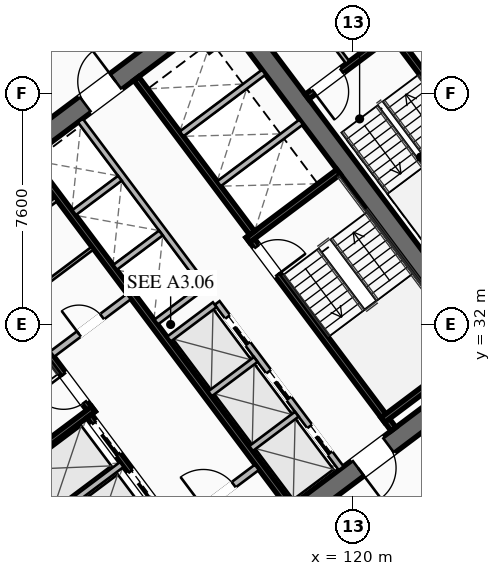
"""IFC4 building model, lengths in metres.
Left out: names, types, materials, properties, quantities, classifications, styles, units other than length and angle.
Written with IfcOpenShell. Run it as: python <this file> out.ifc"""

import sys

from ifc_helpers import new_model, si_unit, direction, frame, frame_2d, origin, place, context, subcontext, project, spatial, rectangle, extrude, element, fill, save


model = new_model("IFC4")
c1 = context("Model", 3, precision=1e-05, world=origin(), true_north=direction((0.0, 1.0)))
c2 = subcontext(c1, "Body", "Model", "MODEL_VIEW")
j1 = project(units=[si_unit("LENGTHUNIT", "METRE"), si_unit("PLANEANGLEUNIT", "RADIAN")], contexts=[c1])
p1 = place(None, origin())
s1 = spatial("IfcSite", under=j1, at=p1, CompositionType="ELEMENT")
p2 = place(p1, origin())
s2 = spatial("IfcBuilding", under=s1, at=p2, CompositionType="ELEMENT")
p3 = place(p2, frame((0.0, 0.0, 28.15)))
s3 = spatial("IfcBuildingStorey", under=s2, at=p3, CompositionType="ELEMENT", Elevation=28.15)
for number, where, z_axis, x_axis in (
    (1, (112.476, 21.107, 0.0), (0.0, 0.0, 1.0), (-0.6, 0.8, 0.0)),
    (2, (115.524, 42.893, 0.0), (0.0, 0.0, 1.0), (0.6, -0.8, 0.0)),
):
    element("IfcWall", number, at=place(p3, frame(where, z_axis=z_axis, x_axis=x_axis)), inside=s3, PredefinedType="SHEAR", context=c2, shape_type="SweptSolid", body=[
        extrude(rectangle(XDim=15.6, YDim=0.65, at=frame_2d((7.8, 0.0))), origin(), (0.0, 0.0, 1.0), 3.55),
    ])
p4 = place(p3, frame((124.429, 30.478, 0.0), z_axis=(0.0, 0.0, 1.0), x_axis=(-0.799998028465, -0.600002628705, 0.0)))
e3 = element("IfcWall", 3, at=p4, inside=s3, PredefinedType="SHEAR", context=c2, shape_type="SweptSolid", body=[
    extrude(rectangle(XDim=14.86, YDim=0.65, at=frame_2d((7.43, 0.0))), origin(), (0.0, 0.0, 1.0), 3.55),
])
p5 = place(p4, frame((9.13, 0.0, 0.0)))
e4 = element("IfcOpeningElement", 4, at=p5, cuts=e3, PredefinedType="OPENING", context=c2, shape_type="SweptSolid", body=[
    extrude(rectangle(XDim=1.25, YDim=2.25, at=frame_2d((0.625, 1.125))), frame((0.0, 0.335, 0.0), z_axis=(0.0, -1.0, 0.0), x_axis=(1.0, 0.0, 0.0)), (0.0, 0.0, 1.0), 0.67),
])
p6 = place(p4, frame((4.08, 0.0, 0.0)))
e5 = element("IfcOpeningElement", 5, at=p6, cuts=e3, PredefinedType="OPENING", context=c2, shape_type="SweptSolid", body=[
    extrude(rectangle(XDim=1.25, YDim=2.25, at=frame_2d((0.625, 1.125))), frame((0.0, 0.335, 0.0), z_axis=(0.0, -1.0, 0.0), x_axis=(1.0, 0.0, 0.0)), (0.0, 0.0, 1.0), 0.67),
])
p7 = place(p3, frame((103.571, 33.522, 0.0), z_axis=(0.0, 0.0, 1.0), x_axis=(0.799998028465, 0.600002628705, 0.0)))
e6 = element("IfcWall", 6, at=p7, inside=s3, PredefinedType="SHEAR", context=c2, shape_type="SweptSolid", body=[
    extrude(rectangle(XDim=14.86, YDim=0.65, at=frame_2d((7.43, 0.0))), origin(), (0.0, 0.0, 1.0), 3.55),
])
p8 = place(p7, frame((4.48, 0.0, 0.0)))
e7 = element("IfcOpeningElement", 7, at=p8, cuts=e6, PredefinedType="OPENING", context=c2, shape_type="SweptSolid", body=[
    extrude(rectangle(XDim=1.25, YDim=2.25, at=frame_2d((0.625, 1.125))), frame((0.0, 0.335, 0.0), z_axis=(0.0, -1.0, 0.0), x_axis=(1.0, 0.0, 0.0)), (0.0, 0.0, 1.0), 0.67),
])
p9 = place(p7, frame((9.53, 0.0, 0.0)))
e8 = element("IfcOpeningElement", 8, at=p9, cuts=e6, PredefinedType="OPENING", context=c2, shape_type="SweptSolid", body=[
    extrude(rectangle(XDim=1.25, YDim=2.25, at=frame_2d((0.625, 1.125))), frame((0.0, 0.335, 0.0), z_axis=(0.0, -1.0, 0.0), x_axis=(1.0, 0.0, 0.0)), (0.0, 0.0, 1.0), 0.67),
])
p10 = place(p3, frame((111.44, 29.08, 0.0), z_axis=(0.0, 0.0, 1.0), x_axis=(-0.600009827119, 0.799992629566, 0.0)))
e9 = element("IfcWall", 9, at=p10, inside=s3, PredefinedType="SHEAR", context=c2, shape_type="SweptSolid", body=[
    extrude(rectangle(XDim=7.95, YDim=0.2, at=frame_2d((3.975, 0.0))), origin(), (0.0, 0.0, 1.0), 3.35),
])
p11 = place(p10, frame((0.45, 0.0, 0.0)))
e10 = element("IfcOpeningElement", 10, at=p11, cuts=e9, PredefinedType="OPENING", context=c2, shape_type="SweptSolid", body=[
    extrude(rectangle(XDim=1.15, YDim=2.2, at=frame_2d((0.575, 1.1))), frame((0.0, 0.11, 0.0), z_axis=(0.0, -1.0, 0.0), x_axis=(1.0, 0.0, 0.0)), (0.0, 0.0, 1.0), 0.22),
])
p12 = place(p3, frame((108.476, 26.982, 0.0), z_axis=(0.0, 0.0, 1.0), x_axis=(0.799984290658, 0.600020945218, 0.0)))
e11 = element("IfcWall", 11, at=p12, inside=s3, PredefinedType="SHEAR", context=c2, shape_type="SweptSolid", body=[
    extrude(rectangle(XDim=3.73, YDim=0.2, at=frame_2d((1.865, 0.0))), origin(), (0.0, 0.0, 1.0), 3.35),
])
p13 = place(p3, frame((116.56, 34.92, 0.0), z_axis=(0.0, 0.0, 1.0), x_axis=(0.600009827119, -0.799992629566, 0.0)))
e12 = element("IfcWall", 12, at=p13, inside=s3, PredefinedType="SHEAR", context=c2, shape_type="SweptSolid", body=[
    extrude(rectangle(XDim=7.95, YDim=0.2, at=frame_2d((3.975, 0.0))), origin(), (0.0, 0.0, 1.0), 3.35),
])
p14 = place(p13, frame((0.45, 0.0, 0.0)))
e13 = element("IfcOpeningElement", 13, at=p14, cuts=e12, PredefinedType="OPENING", context=c2, shape_type="SweptSolid", body=[
    extrude(rectangle(XDim=1.15, YDim=2.2, at=frame_2d((0.575, 1.1))), frame((0.0, 0.11, 0.0), z_axis=(0.0, -1.0, 0.0), x_axis=(1.0, 0.0, 0.0)), (0.0, 0.0, 1.0), 0.22),
])
for number, where, z_axis, x_axis in (
    (14, (116.54, 34.78, 0.0), (0.0, 0.0, 1.0), (0.8, 0.6, 0.0)),
    (15, (120.98, 28.86, 0.0), (0.0, 0.0, 1.0), (0.8, 0.6, 0.0)),
):
    element("IfcWall", number, at=place(p3, frame(where, z_axis=z_axis, x_axis=x_axis)), inside=s3, PredefinedType="SHEAR", context=c2, shape_type="SweptSolid", body=[
        extrude(rectangle(XDim=3.73, YDim=0.2, at=frame_2d((1.865, 0.0))), origin(), (0.0, 0.0, 1.0), 3.35),
    ])
p15 = place(p3, frame((117.938, 26.016, 0.0), z_axis=(0.0, 0.0, 1.0), x_axis=(-0.600005463273, 0.799995902516, 0.0)))
e16 = element("IfcWall", 16, at=p15, inside=s3, PredefinedType="SHEAR", context=c2, shape_type="SweptSolid", body=[
    extrude(rectangle(XDim=14.3, YDim=0.2, at=frame_2d((7.15, 0.0))), origin(), (0.0, 0.0, 1.0), 3.35),
])
p16 = place(p3, frame((110.104, 31.028, 0.0), z_axis=(0.0, 0.0, 1.0), x_axis=(0.800018601094, 0.59997519774, 0.0)))
e17 = element("IfcWall", 17, at=p16, inside=s3, PredefinedType="SOLIDWALL", context=c2, shape_type="SweptSolid", body=[
    extrude(rectangle(XDim=3.15, YDim=0.22, at=frame_2d((1.575, 0.0))), origin(), (0.0, 0.0, 1.0), 2.703),
])
p17 = place(p16, frame((1.1, 0.0, 0.0)))
e18 = element("IfcOpeningElement", 18, at=p17, cuts=e17, PredefinedType="OPENING", context=c2, shape_type="SweptSolid", body=[
    extrude(rectangle(XDim=0.95, YDim=2.05, at=frame_2d((0.475, 1.025))), frame((0.0, 0.12, 0.0), z_axis=(0.0, -1.0, 0.0), x_axis=(1.0, 0.0, 0.0)), (0.0, 0.0, 1.0), 0.24),
])
p18 = place(p3, frame((114.316, 25.412, 0.0), z_axis=(0.0, 0.0, 1.0), x_axis=(0.800018601094, 0.59997519774, 0.0)))
e19 = element("IfcWall", 19, at=p18, inside=s3, PredefinedType="SOLIDWALL", context=c2, shape_type="SweptSolid", body=[
    extrude(rectangle(XDim=3.15, YDim=0.22, at=frame_2d((1.575, 0.0))), origin(), (0.0, 0.0, 1.0), 2.703),
])
p19 = place(p18, frame((0.95, 0.0, 0.0)))
e20 = element("IfcOpeningElement", 20, at=p19, cuts=e19, PredefinedType="OPENING", context=c2, shape_type="SweptSolid", body=[
    extrude(rectangle(XDim=1.25, YDim=2.25, at=frame_2d((0.625, 1.125))), frame((0.0, 0.12, 0.0), z_axis=(0.0, -1.0, 0.0), x_axis=(1.0, 0.0, 0.0)), (0.0, 0.0, 1.0), 0.24),
])
p20 = place(p3, frame((115.13, 23.91, 0.0), z_axis=(0.0, 0.0, 1.0), x_axis=(-0.599975393228, 0.800018454488, 0.0)))
e21 = element("IfcWall", 21, at=p20, inside=s3, PredefinedType="SHEAR", context=c2, shape_type="SweptSolid", body=[
    extrude(rectangle(XDim=6.35, YDim=0.2, at=frame_2d((3.175, 0.0))), origin(), (0.0, 0.0, 1.0), 3.35),
])
p21 = place(p20, frame((4.775, 0.0, 0.0)))
e22 = element("IfcOpeningElement", 22, at=p21, cuts=e21, PredefinedType="OPENING", context=c2, shape_type="SweptSolid", body=[
    extrude(rectangle(XDim=1.3, YDim=2.25, at=frame_2d((0.65, 1.125))), frame((0.0, 0.11, 0.0), z_axis=(0.0, -1.0, 0.0), x_axis=(1.0, 0.0, 0.0)), (0.0, 0.0, 1.0), 0.22),
])
p22 = place(p20, frame((2.775, 0.0, 0.0)))
e23 = element("IfcOpeningElement", 23, at=p22, cuts=e21, PredefinedType="OPENING", context=c2, shape_type="SweptSolid", body=[
    extrude(rectangle(XDim=1.3, YDim=2.25, at=frame_2d((0.65, 1.125))), frame((0.0, 0.11, 0.0), z_axis=(0.0, -1.0, 0.0), x_axis=(1.0, 0.0, 0.0)), (0.0, 0.0, 1.0), 0.22),
])
p23 = place(p20, frame((0.575, 0.0, 0.0)))
e24 = element("IfcOpeningElement", 24, at=p23, cuts=e21, PredefinedType="OPENING", context=c2, shape_type="SweptSolid", body=[
    extrude(rectangle(XDim=1.3, YDim=2.25, at=frame_2d((0.65, 1.125))), frame((0.0, 0.11, 0.0), z_axis=(0.0, -1.0, 0.0), x_axis=(1.0, 0.0, 0.0)), (0.0, 0.0, 1.0), 0.22),
])
p24 = place(p3, frame((109.688, 25.366, 0.0), z_axis=(0.0, 0.0, 1.0), x_axis=(0.8, 0.6, 0.0)))
e25 = element("IfcWall", 25, at=p24, inside=s3, PredefinedType="SOLIDWALL", context=c2, shape_type="SweptSolid", body=[
    extrude(rectangle(XDim=3.38, YDim=0.2, at=frame_2d((1.69, 0.0))), origin(), (0.0, 0.0, 1.0), 3.35),
])
p25 = place(p3, frame((112.87, 40.09, 0.0), z_axis=(0.0, 0.0, 1.0), x_axis=(0.599975393228, -0.800018454488, 0.0)))
e26 = element("IfcWall", 26, at=p25, inside=s3, PredefinedType="SHEAR", context=c2, shape_type="SweptSolid", body=[
    extrude(rectangle(XDim=6.35, YDim=0.2, at=frame_2d((3.175, 0.0))), origin(), (0.0, 0.0, 1.0), 3.35),
])
for number, where, z_axis, x_axis in (
    (27, (115.59, 36.63, 0.0), (0.0, 0.0, 1.0), (0.8, 0.6, 0.0)),
    (28, (114.36, 38.27, 0.0), (0.0, 0.0, 1.0), (0.8, 0.6, 0.0)),
):
    element("IfcWall", number, at=place(p3, frame(where, z_axis=z_axis, x_axis=x_axis)), inside=s3, PredefinedType="SOLIDWALL", context=c2, shape_type="SweptSolid", body=[
        extrude(rectangle(XDim=3.38, YDim=0.2, at=frame_2d((1.69, 0.0))), origin(), (0.0, 0.0, 1.0), 3.35),
    ])
p26 = place(p3, frame((107.71, 34.22, 0.0), z_axis=(0.0, 0.0, 1.0), x_axis=(0.799981399002, 0.60002480053, 0.0)))
e29 = element("IfcWall", 29, at=p26, inside=s3, PredefinedType="PARTITIONING", context=c2, shape_type="SweptSolid", body=[
    extrude(rectangle(XDim=3.15, YDim=0.135, at=frame_2d((1.575, 0.0))), origin(), (0.0, 0.0, 1.0), 2.703),
])
p27 = place(p26, frame((1.05, 0.0, 0.0)))
e30 = element("IfcOpeningElement", 30, at=p27, cuts=e29, PredefinedType="OPENING", context=c2, shape_type="SweptSolid", body=[
    extrude(rectangle(XDim=1.05, YDim=2.2, at=frame_2d((0.525, 1.1))), frame((0.0, 0.077, 0.0), z_axis=(0.0, -1.0, 0.0), x_axis=(1.0, 0.0, 0.0)), (0.0, 0.0, 1.0), 0.155),
])
p28 = place(p3, frame((108.91, 32.62, 0.0), z_axis=(0.0, 0.0, 1.0), x_axis=(0.800018601094, 0.59997519774, 0.0)))
e31 = element("IfcWall", 31, at=p28, inside=s3, PredefinedType="PARTITIONING", context=c2, shape_type="SweptSolid", body=[
    extrude(rectangle(XDim=3.15, YDim=0.11, at=frame_2d((1.575, 0.0))), origin(), (0.0, 0.0, 1.0), 2.703),
])
p29 = place(p3, frame((119.61, 27.27, 0.0), z_axis=(0.0, 0.0, 1.0), x_axis=(-0.600011488909, 0.79999138319, 0.0)))
e32 = element("IfcWall", 32, at=p29, inside=s3, PredefinedType="SOLIDWALL", context=c2, shape_type="SweptSolid", body=[
    extrude(rectangle(XDim=6.8, YDim=0.2, at=frame_2d((3.4, 0.0))), origin(), (0.0, 0.0, 1.0), 3.35),
])
p30 = place(p29, frame((0.625, 0.0, 0.0)))
e33 = element("IfcOpeningElement", 33, at=p30, cuts=e32, PredefinedType="OPENING", context=c2, shape_type="SweptSolid", body=[
    extrude(rectangle(XDim=1.1, YDim=2.2, at=frame_2d((0.55, 1.1))), frame((0.0, 0.11, 0.0), z_axis=(0.0, -1.0, 0.0), x_axis=(1.0, 0.0, 0.0)), (0.0, 0.0, 1.0), 0.22),
])
p31 = place(p29, frame((2.875, 0.0, 0.0)))
e34 = element("IfcOpeningElement", 34, at=p31, cuts=e32, PredefinedType="OPENING", context=c2, shape_type="SweptSolid", body=[
    extrude(rectangle(XDim=1.1, YDim=2.2, at=frame_2d((0.55, 1.1))), frame((0.0, 0.11, 0.0), z_axis=(0.0, -1.0, 0.0), x_axis=(1.0, 0.0, 0.0)), (0.0, 0.0, 1.0), 0.22),
])
p32 = place(p29, frame((5.125, 0.0, 0.0)))
e35 = element("IfcOpeningElement", 35, at=p32, cuts=e32, PredefinedType="OPENING", context=c2, shape_type="SweptSolid", body=[
    extrude(rectangle(XDim=1.1, YDim=2.2, at=frame_2d((0.55, 1.1))), frame((0.0, 0.11, 0.0), z_axis=(0.0, -1.0, 0.0), x_axis=(1.0, 0.0, 0.0)), (0.0, 0.0, 1.0), 0.22),
])
p33 = place(p3, frame((116.646, 27.922, 0.0), z_axis=(0.0, 0.0, 1.0), x_axis=(0.8, 0.6, 0.0)))
e36 = element("IfcWall", 36, at=p33, inside=s3, PredefinedType="SOLIDWALL", context=c2, shape_type="SweptSolid", body=[
    extrude(rectangle(XDim=1.88, YDim=0.2, at=frame_2d((0.94, 0.0))), origin(), (0.0, 0.0, 1.0), 3.35),
])
p34 = place(p3, frame((115.296, 29.722, 0.0), z_axis=(0.0, 0.0, 1.0), x_axis=(0.799984418148, 0.600020775241, 0.0)))
e37 = element("IfcWall", 37, at=p34, inside=s3, PredefinedType="SOLIDWALL", context=c2, shape_type="SweptSolid", body=[
    extrude(rectangle(XDim=1.88, YDim=0.2, at=frame_2d((0.94, 0.0))), origin(), (0.0, 0.0, 1.0), 3.35),
])
p35 = place(p3, frame((113.946, 31.522, 0.0), z_axis=(0.0, 0.0, 1.0), x_axis=(0.8, 0.6, 0.0)))
e38 = element("IfcWall", 38, at=p35, inside=s3, PredefinedType="SOLIDWALL", context=c2, shape_type="SweptSolid", body=[
    extrude(rectangle(XDim=1.88, YDim=0.2, at=frame_2d((0.94, 0.0))), origin(), (0.0, 0.0, 1.0), 3.35),
])
p36 = place(p3, frame((115.11, 33.27, 0.0), z_axis=(0.0, 0.0, 1.0), x_axis=(-0.600011488909, 0.79999138319, 0.0)))
e39 = element("IfcWall", 39, at=p36, inside=s3, PredefinedType="SOLIDWALL", context=c2, shape_type="SweptSolid", body=[
    extrude(rectangle(XDim=6.8, YDim=0.2, at=frame_2d((3.4, 0.0))), origin(), (0.0, 0.0, 1.0), 3.35),
])
p37 = place(p3, frame((113.526, 32.082, 0.0), z_axis=(0.0, 0.0, 1.0), x_axis=(0.800046745961, 0.599937666993, 0.0)))
e40 = element("IfcWall", 40, at=p37, inside=s3, PredefinedType="SOLIDWALL", context=c2, shape_type="SweptSolid", body=[
    extrude(rectangle(XDim=1.88, YDim=0.2, at=frame_2d((0.94, 0.0))), origin(), (0.0, 0.0, 1.0), 3.35),
])
p38 = place(p3, frame((112.176, 33.882, 0.0), z_axis=(0.0, 0.0, 1.0), x_axis=(0.8, 0.6, 0.0)))
e41 = element("IfcWall", 41, at=p38, inside=s3, PredefinedType="SOLIDWALL", context=c2, shape_type="SweptSolid", body=[
    extrude(rectangle(XDim=1.88, YDim=0.2, at=frame_2d((0.94, 0.0))), origin(), (0.0, 0.0, 1.0), 3.35),
])
p39 = place(p3, frame((110.826, 35.682, 0.0), z_axis=(0.0, 0.0, 1.0), x_axis=(0.799984418148, 0.600020775241, 0.0)))
e42 = element("IfcWall", 42, at=p39, inside=s3, PredefinedType="SOLIDWALL", context=c2, shape_type="SweptSolid", body=[
    extrude(rectangle(XDim=1.88, YDim=0.2, at=frame_2d((0.94, 0.0))), origin(), (0.0, 0.0, 1.0), 3.35),
])
p40 = place(p3, frame((125.304, 36.228, 0.0), z_axis=(0.0, 0.0, 1.0), x_axis=(-0.59998851072, 0.800008616831, 0.0)))
e43 = element("IfcWall", 43, at=p40, inside=s3, PredefinedType="SHEAR", context=c2, shape_type="SweptSolid", body=[
    extrude(rectangle(XDim=6.8, YDim=0.2, at=frame_2d((3.4, 0.0))), origin(), (0.0, 0.0, 1.0), 3.35),
])
p41 = place(p3, frame((121.204, 41.528, 0.0), z_axis=(0.0, 0.0, 1.0), x_axis=(-0.800017232136, -0.599977023131, 0.0)))
e44 = element("IfcWall", 44, at=p41, inside=s3, PredefinedType="SHEAR", context=c2, shape_type="SweptSolid", body=[
    extrude(rectangle(XDim=3.4, YDim=0.2, at=frame_2d((1.7, 0.0))), origin(), (0.0, 0.0, 1.0), 3.35),
])
p42 = place(p41, frame((1.975, 0.0, 0.0)))
e45 = element("IfcOpeningElement", 45, at=p42, cuts=e44, PredefinedType="OPENING", context=c2, shape_type="SweptSolid", body=[
    extrude(rectangle(XDim=1.15, YDim=2.2, at=frame_2d((0.575, 1.1))), frame((0.0, 0.11, 0.0), z_axis=(0.0, -1.0, 0.0), x_axis=(1.0, 0.0, 0.0)), (0.0, 0.0, 1.0), 0.22),
])
p43 = place(p3, frame((119.824, 40.618, 0.0), z_axis=(0.0, 0.0, 1.0), x_axis=(-0.599982243973, 0.800013316712, 0.0)))
e46 = element("IfcWall", 46, at=p43, inside=s3, PredefinedType="PARTITIONING", context=c2, shape_type="SweptSolid", body=[
    extrude(rectangle(XDim=4.4, YDim=0.135, at=frame_2d((2.2, 0.0))), origin(), (0.0, 0.0, 1.0), 2.703),
])
p44 = place(p3, frame((98.516, 34.012, 0.0), z_axis=(0.0, 0.0, 1.0), x_axis=(0.799998035726, 0.600002619023, 0.0)))
e47 = element("IfcWall", 47, at=p44, inside=s3, PredefinedType="PARTITIONING", context=c2, shape_type="SweptSolid", body=[
    extrude(rectangle(XDim=29.83, YDim=0.135, at=frame_2d((14.915, 0.0))), origin(), (0.0, 0.0, 1.0), 2.703),
])
p45 = place(p44, frame((0.3, 0.0, 0.0)))
e48 = element("IfcOpeningElement", 48, at=p45, cuts=e47, PredefinedType="OPENING", context=c2, shape_type="SweptSolid", body=[
    extrude(rectangle(XDim=0.95, YDim=2.05, at=frame_2d((0.475, 1.025))), frame((0.0, 0.077, 0.0), z_axis=(0.0, -1.0, 0.0), x_axis=(1.0, 0.0, 0.0)), (0.0, 0.0, 1.0), 0.155),
])
p46 = place(p44, frame((10.829, 0.0, 0.0)))
e49 = element("IfcOpeningElement", 49, at=p46, cuts=e47, PredefinedType="OPENING", context=c2, shape_type="SweptSolid", body=[
    extrude(rectangle(XDim=0.95, YDim=2.05, at=frame_2d((0.475, 1.025))), frame((0.0, 0.077, 0.0), z_axis=(0.0, -1.0, 0.0), x_axis=(1.0, 0.0, 0.0)), (0.0, 0.0, 1.0), 0.155),
])
p47 = place(p44, frame((28.58, 0.0, 0.0)))
e50 = element("IfcOpeningElement", 50, at=p47, cuts=e47, PredefinedType="OPENING", context=c2, shape_type="SweptSolid", body=[
    extrude(rectangle(XDim=0.95, YDim=2.05, at=frame_2d((0.475, 1.025))), frame((0.0, 0.077, 0.0), z_axis=(0.0, -1.0, 0.0), x_axis=(1.0, 0.0, 0.0)), (0.0, 0.0, 1.0), 0.155),
])
p48 = place(p3, frame((135.46, 34.47, 0.0), z_axis=(0.0, 0.0, 1.0), x_axis=(-0.800000982127, -0.599998690494, 0.0)))
e51 = element("IfcWall", 51, at=p48, inside=s3, PredefinedType="PARTITIONING", context=c2, shape_type="SweptSolid", body=[
    extrude(rectangle(XDim=29.83, YDim=0.135, at=frame_2d((14.915, 0.0))), origin(), (0.0, 0.0, 1.0), 2.703),
])
p49 = place(p48, frame((28.5, 0.0, 0.0)))
e52 = element("IfcOpeningElement", 52, at=p49, cuts=e51, PredefinedType="OPENING", context=c2, shape_type="SweptSolid", body=[
    extrude(rectangle(XDim=0.95, YDim=2.05, at=frame_2d((0.475, 1.025))), frame((0.0, 0.077, 0.0), z_axis=(0.0, -1.0, 0.0), x_axis=(1.0, 0.0, 0.0)), (0.0, 0.0, 1.0), 0.155),
])
p50 = place(p48, frame((18.075, 0.0, 0.0)))
e53 = element("IfcOpeningElement", 53, at=p50, cuts=e51, PredefinedType="OPENING", context=c2, shape_type="SweptSolid", body=[
    extrude(rectangle(XDim=0.95, YDim=2.05, at=frame_2d((0.475, 1.025))), frame((0.0, 0.077, 0.0), z_axis=(0.0, -1.0, 0.0), x_axis=(1.0, 0.0, 0.0)), (0.0, 0.0, 1.0), 0.155),
])
p51 = place(p48, frame((0.38, 0.0, 0.0)))
e54 = element("IfcOpeningElement", 54, at=p51, cuts=e51, PredefinedType="OPENING", context=c2, shape_type="SweptSolid", body=[
    extrude(rectangle(XDim=0.95, YDim=2.05, at=frame_2d((0.475, 1.025))), frame((0.0, 0.077, 0.0), z_axis=(0.0, -1.0, 0.0), x_axis=(1.0, 0.0, 0.0)), (0.0, 0.0, 1.0), 0.155),
])
p52 = place(p3, frame((111.548, 16.636, 0.0), z_axis=(0.0, 0.0, 1.0), x_axis=(-0.600003610192, 0.799997292343, 0.0)))
e55 = element("IfcWall", 55, at=p52, inside=s3, PredefinedType="PARTITIONING", context=c2, shape_type="SweptSolid", body=[
    extrude(rectangle(XDim=21.64, YDim=0.135, at=frame_2d((10.82, 0.0))), origin(), (0.0, 0.0, 1.0), 2.703),
])
p53 = place(p52, frame((0.3, 0.0, 0.0)))
e56 = element("IfcOpeningElement", 56, at=p53, cuts=e55, PredefinedType="OPENING", context=c2, shape_type="SweptSolid", body=[
    extrude(rectangle(XDim=0.95, YDim=2.05, at=frame_2d((0.475, 1.025))), frame((0.0, 0.077, 0.0), z_axis=(0.0, -1.0, 0.0), x_axis=(1.0, 0.0, 0.0)), (0.0, 0.0, 1.0), 0.155),
])
p54 = place(p9, origin())
e57 = element("IfcDoor", 57, at=p54, inside=s3, OperationType="SINGLE_SWING_RIGHT", PredefinedType="DOOR", context=c2, shape_type="SweptSolid", body=[
    extrude(rectangle(XDim=1.25, YDim=2.25, at=frame_2d((0.625, 1.125))), frame((0.0, 0.025, 0.0), z_axis=(0.0, -1.0, 0.0), x_axis=(1.0, 0.0, 0.0)), (0.0, 0.0, 1.0), 0.05),
])
fill(e8, e57)
p55 = place(p6, origin())
e58 = element("IfcDoor", 58, at=p55, inside=s3, OperationType="SINGLE_SWING_RIGHT", PredefinedType="DOOR", context=c2, shape_type="SweptSolid", body=[
    extrude(rectangle(XDim=1.25, YDim=2.25, at=frame_2d((0.625, 1.125))), frame((0.0, 0.025, 0.0), z_axis=(0.0, -1.0, 0.0), x_axis=(1.0, 0.0, 0.0)), (0.0, 0.0, 1.0), 0.05),
])
fill(e5, e58)
p56 = place(p11, origin())
e59 = element("IfcDoor", 59, at=p56, inside=s3, OperationType="SINGLE_SWING_RIGHT", PredefinedType="DOOR", context=c2, shape_type="SweptSolid", body=[
    extrude(rectangle(XDim=1.15, YDim=2.2, at=frame_2d((0.575, 1.1))), frame((0.0, 0.025, 0.0), z_axis=(0.0, -1.0, 0.0), x_axis=(1.0, 0.0, 0.0)), (0.0, 0.0, 1.0), 0.05),
])
fill(e10, e59)
p57 = place(p14, origin())
e60 = element("IfcDoor", 60, at=p57, inside=s3, OperationType="SINGLE_SWING_RIGHT", PredefinedType="DOOR", context=c2, shape_type="SweptSolid", body=[
    extrude(rectangle(XDim=1.15, YDim=2.2, at=frame_2d((0.575, 1.1))), frame((0.0, 0.025, 0.0), z_axis=(0.0, -1.0, 0.0), x_axis=(1.0, 0.0, 0.0)), (0.0, 0.0, 1.0), 0.05),
])
fill(e13, e60)
p58 = place(p19, origin())
e61 = element("IfcDoor", 61, at=p58, inside=s3, OperationType="SINGLE_SWING_LEFT", PredefinedType="DOOR", context=c2, shape_type="SweptSolid", body=[
    extrude(rectangle(XDim=1.25, YDim=2.25, at=frame_2d((0.625, 1.125))), frame((0.0, 0.025, 0.0), z_axis=(0.0, -1.0, 0.0), x_axis=(1.0, 0.0, 0.0)), (0.0, 0.0, 1.0), 0.05),
])
fill(e20, e61)
p59 = place(p17, origin())
e62 = element("IfcDoor", 62, at=p59, inside=s3, OperationType="SINGLE_SWING_LEFT", PredefinedType="DOOR", context=c2, shape_type="SweptSolid", body=[
    extrude(rectangle(XDim=0.95, YDim=2.05, at=frame_2d((0.475, 1.025))), frame((0.0, 0.025, 0.0), z_axis=(0.0, -1.0, 0.0), x_axis=(1.0, 0.0, 0.0)), (0.0, 0.0, 1.0), 0.05),
])
fill(e18, e62)
p60 = place(p42, origin())
e63 = element("IfcDoor", 63, at=p60, inside=s3, OperationType="SINGLE_SWING_RIGHT", PredefinedType="DOOR", context=c2, shape_type="SweptSolid", body=[
    extrude(rectangle(XDim=1.15, YDim=2.2, at=frame_2d((0.575, 1.1))), frame((0.0, 0.025, 0.0), z_axis=(0.0, -1.0, 0.0), x_axis=(1.0, 0.0, 0.0)), (0.0, 0.0, 1.0), 0.05),
])
fill(e45, e63)
p61 = place(p21, origin())
e64 = element("IfcDoor", 64, at=p61, inside=s3, OperationType="SLIDING_TO_LEFT", PredefinedType="DOOR", context=c2, shape_type="SweptSolid", body=[
    extrude(rectangle(XDim=1.3, YDim=2.25, at=frame_2d((0.65, 1.125))), frame((0.0, 0.025, 0.0), z_axis=(0.0, -1.0, 0.0), x_axis=(1.0, 0.0, 0.0)), (0.0, 0.0, 1.0), 0.05),
])
fill(e22, e64)
p62 = place(p22, origin())
e65 = element("IfcDoor", 65, at=p62, inside=s3, OperationType="SLIDING_TO_LEFT", PredefinedType="DOOR", context=c2, shape_type="SweptSolid", body=[
    extrude(rectangle(XDim=1.3, YDim=2.25, at=frame_2d((0.65, 1.125))), frame((0.0, 0.025, 0.0), z_axis=(0.0, -1.0, 0.0), x_axis=(1.0, 0.0, 0.0)), (0.0, 0.0, 1.0), 0.05),
])
fill(e23, e65)
p63 = place(p30, origin())
e66 = element("IfcDoor", 66, at=p63, inside=s3, OperationType="SLIDING_TO_LEFT", PredefinedType="DOOR", context=c2, shape_type="SweptSolid", body=[
    extrude(rectangle(XDim=1.1, YDim=2.2, at=frame_2d((0.55, 1.1))), frame((0.0, 0.025, 0.0), z_axis=(0.0, -1.0, 0.0), x_axis=(1.0, 0.0, 0.0)), (0.0, 0.0, 1.0), 0.05),
])
fill(e33, e66)
p64 = place(p31, origin())
e67 = element("IfcDoor", 67, at=p64, inside=s3, OperationType="SLIDING_TO_LEFT", PredefinedType="DOOR", context=c2, shape_type="SweptSolid", body=[
    extrude(rectangle(XDim=1.1, YDim=2.2, at=frame_2d((0.55, 1.1))), frame((0.0, 0.025, 0.0), z_axis=(0.0, -1.0, 0.0), x_axis=(1.0, 0.0, 0.0)), (0.0, 0.0, 1.0), 0.05),
])
fill(e34, e67)
p65 = place(p32, origin())
e68 = element("IfcDoor", 68, at=p65, inside=s3, OperationType="SLIDING_TO_LEFT", PredefinedType="DOOR", context=c2, shape_type="SweptSolid", body=[
    extrude(rectangle(XDim=1.1, YDim=2.2, at=frame_2d((0.55, 1.1))), frame((0.0, 0.025, 0.0), z_axis=(0.0, -1.0, 0.0), x_axis=(1.0, 0.0, 0.0)), (0.0, 0.0, 1.0), 0.05),
])
fill(e35, e68)
save(model, sys.argv[1])
